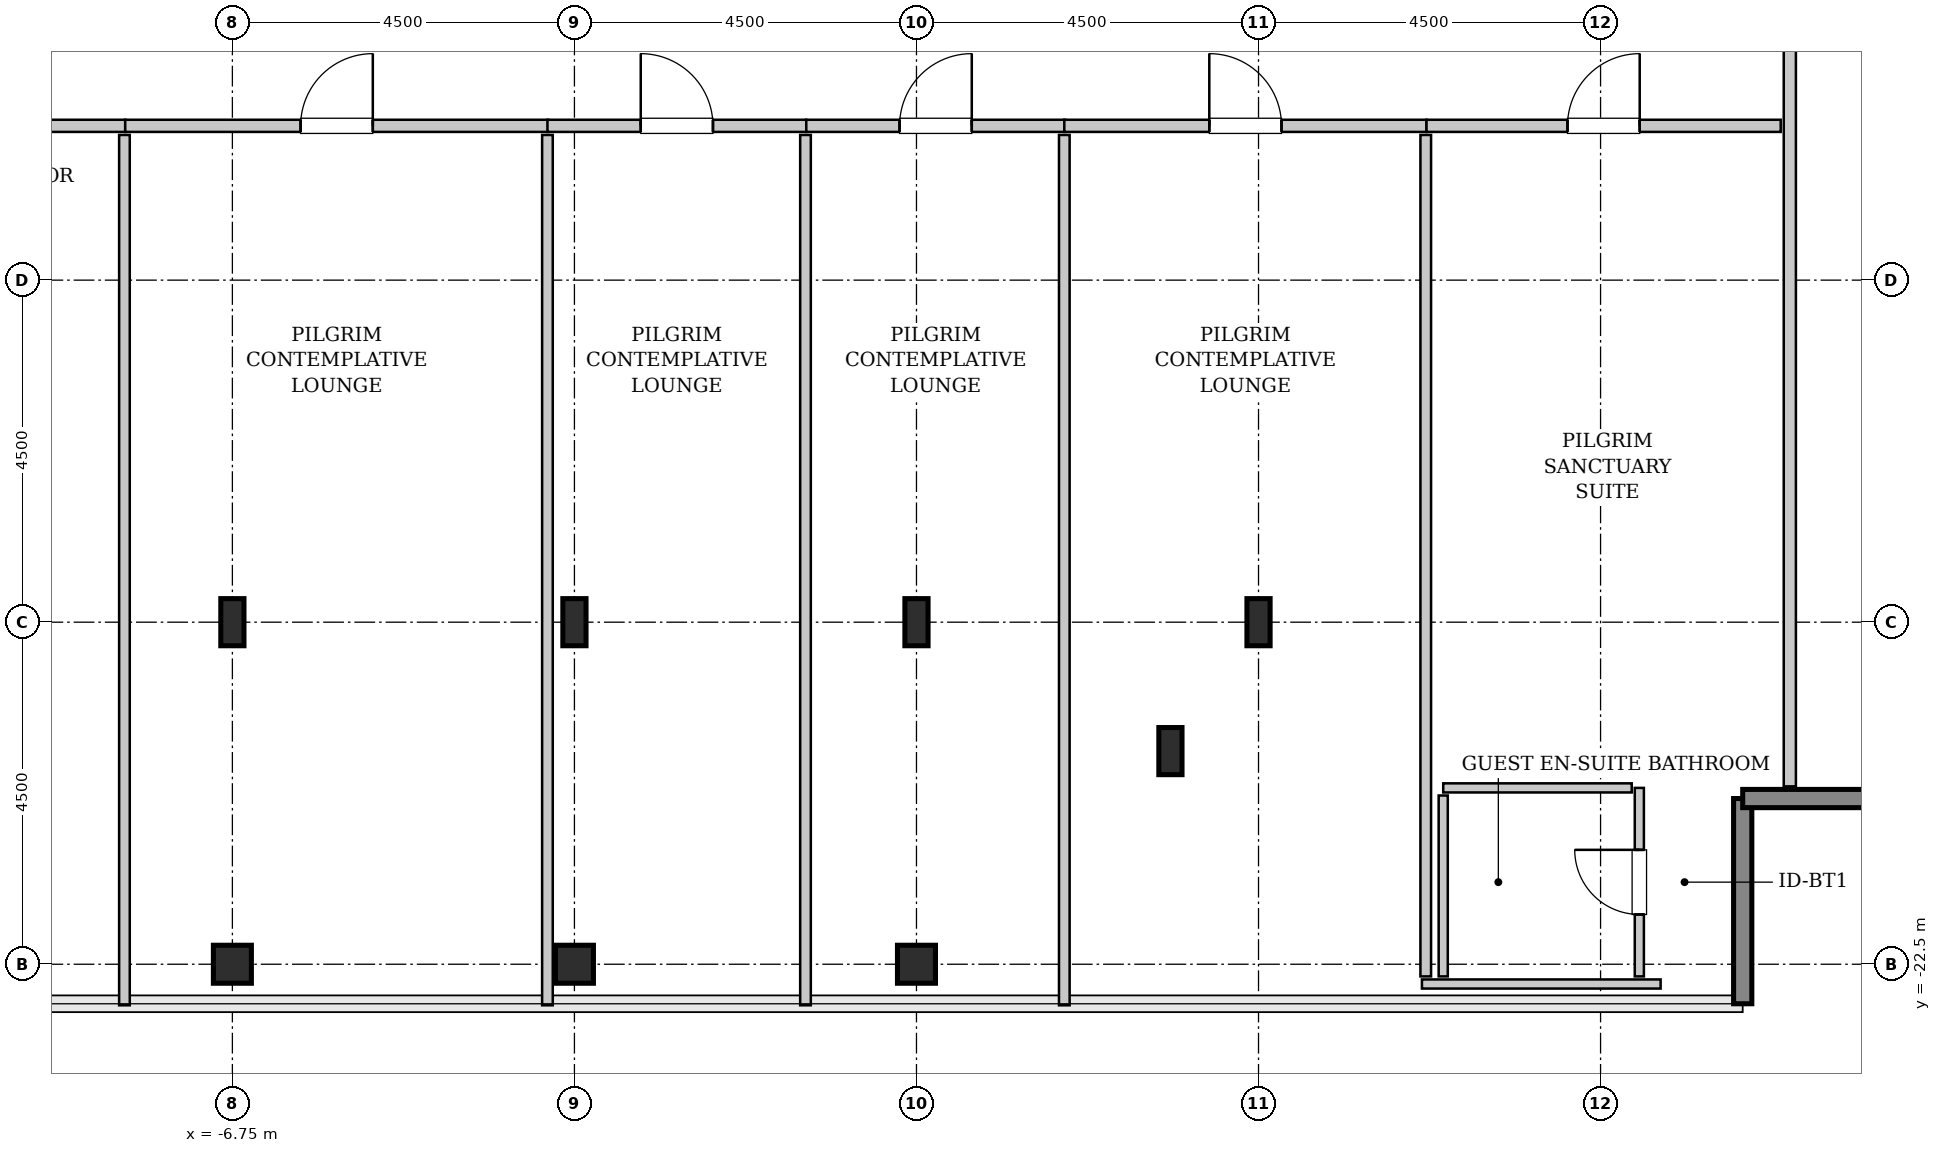
"""IFC4 building model, lengths in metres.
Left out: names, types, materials, properties, quantities, classifications, styles, units other than length and angle.
Written with IfcOpenShell. Run it as: python <this file> out.ifc"""

import sys

from ifc_helpers import new_model, si_unit, direction, frame, frame_2d, origin, origin_2d, place, context, subcontext, project, spatial, rectangle, hollow_rectangle, i_section, extrude, source, transform, mapped, element, fill, save


model = new_model("IFC4")
c1 = context("Model", 3, precision=1e-05, world=origin(), true_north=direction((0.0, 1.0)))
c2 = subcontext(c1, "Body", "Model", "MODEL_VIEW")
j1 = project(units=[si_unit("LENGTHUNIT", "METRE"), si_unit("PLANEANGLEUNIT", "RADIAN")], contexts=[c1])
p1 = place(None, origin())
s1 = spatial("IfcSite", under=j1, at=p1, CompositionType="ELEMENT")
p2 = place(p1, origin())
s2 = spatial("IfcBuilding", under=s1, at=p2, CompositionType="ELEMENT")
p3 = place(p2, frame((0.0, 0.0, 333.8)))
s3 = spatial("IfcBuildingStorey", under=s2, at=p3, CompositionType="ELEMENT", Elevation=333.8)
m1 = source(origin(), c2, "Body", "SweptSolid", [
    extrude(hollow_rectangle(XDim=0.5, YDim=0.5, WallThickness=0.025, InnerFilletRadius=0.025, OuterFilletRadius=0.05, at=origin_2d()), origin(), (0.0, 0.0, 1.0), 3.8),
])
p4 = place(p3, frame((-6.75, -22.5, 0.0), z_axis=(0.0, 0.0, 1.0), x_axis=(1.0, 0.0, 0.0)))
e1 = element("IfcColumn", 1, at=p4, inside=s3, PredefinedType="COLUMN", context=c2, shape_type="MappedRepresentation", body=[
    mapped(m1, transform((0.0, 0.0, 0.0), x_axis=(1.0, 0.0, 0.0), y_axis=(0.0, 1.0, 0.0), z_axis=(0.0, 0.0, 1.0), scale=1.0)),
])
m2 = source(origin(), c2, "Body", "SweptSolid", [
    extrude(i_section(OverallWidth=0.305, OverallDepth=0.62, WebThickness=0.021, FlangeThickness=0.04, FilletRadius=0.027, at=origin_2d()), origin(), (0.0, 0.0, 1.0), 3.8),
])
p5 = place(p3, frame((-6.75, -18.0, 0.0), z_axis=(0.0, 0.0, 1.0), x_axis=(1.0, 0.0, 0.0)))
e2 = element("IfcColumn", 2, at=p5, inside=s3, PredefinedType="COLUMN", context=c2, shape_type="MappedRepresentation", body=[
    mapped(m2, transform((0.0, 0.0, 0.0), x_axis=(1.0, 0.0, 0.0), y_axis=(0.0, 1.0, 0.0), z_axis=(0.0, 0.0, 1.0), scale=1.0)),
])
p6 = place(p3, frame((-2.25, -22.5, 0.0), z_axis=(0.0, 0.0, 1.0), x_axis=(1.0, 0.0, 0.0)))
e3 = element("IfcColumn", 3, at=p6, inside=s3, PredefinedType="COLUMN", context=c2, shape_type="MappedRepresentation", body=[
    mapped(m1, transform((0.0, 0.0, 0.0), x_axis=(1.0, 0.0, 0.0), y_axis=(0.0, 1.0, 0.0), z_axis=(0.0, 0.0, 1.0), scale=1.0)),
])
p7 = place(p3, frame((-2.25, -18.0, 0.0), z_axis=(0.0, 0.0, 1.0), x_axis=(1.0, 0.0, 0.0)))
e4 = element("IfcColumn", 4, at=p7, inside=s3, PredefinedType="COLUMN", context=c2, shape_type="MappedRepresentation", body=[
    mapped(m2, transform((0.0, 0.0, 0.0), x_axis=(1.0, 0.0, 0.0), y_axis=(0.0, 1.0, 0.0), z_axis=(0.0, 0.0, 1.0), scale=1.0)),
])
p8 = place(p3, frame((2.25, -22.5, 0.0), z_axis=(0.0, 0.0, 1.0), x_axis=(1.0, 0.0, 0.0)))
e5 = element("IfcColumn", 5, at=p8, inside=s3, PredefinedType="COLUMN", context=c2, shape_type="MappedRepresentation", body=[
    mapped(m1, transform((0.0, 0.0, 0.0), x_axis=(1.0, 0.0, 0.0), y_axis=(0.0, 1.0, 0.0), z_axis=(0.0, 0.0, 1.0), scale=1.0)),
])
for number, where, z_axis, x_axis in (
    (6, (2.25, -18.0, 0.0), (0.0, 0.0, 1.0), (1.0, 0.0, 0.0)),
    (7, (5.591, -19.696, 0.0), (0.0, 0.0, 1.0), (1.0, 0.0, 0.0)),
    (8, (6.75, -18.0, 0.0), (0.0, 0.0, 1.0), (1.0, 0.0, 0.0)),
):
    element("IfcColumn", number, at=place(p3, frame(where, z_axis=z_axis, x_axis=x_axis)), inside=s3, PredefinedType="COLUMN", context=c2, shape_type="MappedRepresentation", body=[
        mapped(m2, transform((0.0, 0.0, 0.0), x_axis=(1.0, 0.0, 0.0), y_axis=(0.0, 1.0, 0.0), z_axis=(0.0, 0.0, 1.0), scale=1.0)),
    ])
m3 = source(origin(), c2, "Body", "SweptSolid", [
    extrude(rectangle(XDim=2.7, YDim=0.24, at=frame_2d((1.35, 0.0))), origin(), (0.0, 0.0, 1.0), 3.55),
])
for number, where, z_axis, x_axis in (
    (9, (13.12, -23.02, 0.0), (0.0, 0.0, 1.0), (0.0, 1.0, 0.0)),
    (10, (13.12, -20.32, 0.0), (0.0, 0.0, 1.0), (1.0, 0.0, 0.0)),
):
    element("IfcWall", number, at=place(p3, frame(where, z_axis=z_axis, x_axis=x_axis)), inside=s3, PredefinedType="SHEAR", context=c2, shape_type="MappedRepresentation", body=[
        mapped(m3, transform((0.0, 0.0, 0.0), x_axis=(1.0, 0.0, 0.0), y_axis=(0.0, 1.0, 0.0), z_axis=(0.0, 0.0, 1.0), scale=1.0)),
    ])
m4 = source(origin(), c2, "Body", "SweptSolid", [
    extrude(rectangle(XDim=3.14, YDim=0.12, at=frame_2d((1.57, 0.0))), origin(), (0.0, 0.0, 1.0), 3.535),
])
p9 = place(p3, frame((8.9, -22.76, 0.0), z_axis=(0.0, 0.0, 1.0), x_axis=(1.0, 0.0, 0.0)))
e11 = element("IfcWall", 11, at=p9, inside=s3, PredefinedType="PLUMBINGWALL", context=c2, shape_type="MappedRepresentation", body=[
    mapped(m4, transform((0.0, 0.0, 0.0), x_axis=(1.0, 0.0, 0.0), y_axis=(0.0, 1.0, 0.0), z_axis=(0.0, 0.0, 1.0), scale=1.0)),
])
m5 = source(origin(), c2, "Body", "SweptSolid", [
    extrude(rectangle(XDim=2.48, YDim=0.12, at=frame_2d((1.24, 0.0))), origin(), (0.0, 0.0, 1.0), 3.535),
])
p10 = place(p3, frame((11.76, -22.66, 0.0), z_axis=(0.0, 0.0, 1.0), x_axis=(0.0, 1.0, 0.0)))
e12 = element("IfcWall", 12, at=p10, inside=s3, PredefinedType="PLUMBINGWALL", context=c2, shape_type="MappedRepresentation", body=[
    mapped(m5, transform((0.0, 0.0, 0.0), x_axis=(1.0, 0.0, 0.0), y_axis=(0.0, 1.0, 0.0), z_axis=(0.0, 0.0, 1.0), scale=1.0)),
])
p11 = place(p10, frame((0.815, 0.0, 0.0)))
e13 = element("IfcOpeningElement", 13, at=p11, cuts=e12, PredefinedType="OPENING", context=c2, shape_type="SweptSolid", body=[
    extrude(rectangle(XDim=0.85, YDim=2.1, at=frame_2d((0.425, 1.05))), frame((0.0, 0.07, 0.0), z_axis=(0.0, -1.0, 0.0), x_axis=(1.0, 0.0, 0.0)), (0.0, 0.0, 1.0), 0.14),
])
p12 = place(p3, frame((9.18, -20.18, 0.0), z_axis=(0.0, 0.0, 1.0), x_axis=(1.0, 0.0, 0.0)))
e14 = element("IfcWall", 14, at=p12, inside=s3, PredefinedType="PLUMBINGWALL", context=c2, shape_type="MappedRepresentation", body=[
    mapped(m5, transform((0.0, 0.0, 0.0), x_axis=(1.0, 0.0, 0.0), y_axis=(0.0, 1.0, 0.0), z_axis=(0.0, 0.0, 1.0), scale=1.0)),
])
m6 = source(origin(), c2, "Body", "SweptSolid", [
    extrude(rectangle(XDim=2.38, YDim=0.12, at=frame_2d((1.19, 0.0))), origin(), (0.0, 0.0, 1.0), 3.535),
])
p13 = place(p3, frame((9.18, -22.66, 0.0), z_axis=(0.0, 0.0, 1.0), x_axis=(0.0, 1.0, 0.0)))
e15 = element("IfcWall", 15, at=p13, inside=s3, PredefinedType="PLUMBINGWALL", context=c2, shape_type="MappedRepresentation", body=[
    mapped(m6, transform((0.0, 0.0, 0.0), x_axis=(1.0, 0.0, 0.0), y_axis=(0.0, 1.0, 0.0), z_axis=(0.0, 0.0, 1.0), scale=1.0)),
])
m7 = source(origin(), c2, "Body", "SweptSolid", [
    extrude(rectangle(XDim=16.965, YDim=0.16, at=frame_2d((8.482, 0.0))), origin(), (0.0, 0.0, 1.0), 3.535),
])
p14 = place(p3, frame((13.74, -20.16, 0.0), z_axis=(0.0, 0.0, 1.0), x_axis=(0.0, 1.0, 0.0)))
e16 = element("IfcWall", 16, at=p14, inside=s3, PredefinedType="PARTITIONING", context=c2, shape_type="MappedRepresentation", body=[
    mapped(m7, transform((0.0, 0.0, 0.0), x_axis=(1.0, 0.0, 0.0), y_axis=(0.0, 1.0, 0.0), z_axis=(0.0, 0.0, 1.0), scale=1.0)),
])
p15 = place(p14, frame((12.333, 0.0, 0.0)))
e17 = element("IfcOpeningElement", 17, at=p15, cuts=e16, PredefinedType="OPENING", context=c2, shape_type="SweptSolid", body=[
    extrude(rectangle(XDim=0.95, YDim=2.1, at=frame_2d((0.475, 1.05))), frame((0.0, 0.09, 0.0), z_axis=(0.0, -1.0, 0.0), x_axis=(1.0, 0.0, 0.0)), (0.0, 0.0, 1.0), 0.18),
])
m8 = source(origin(), c2, "Body", "SweptSolid", [
    extrude(rectangle(XDim=5.46, YDim=0.16, at=frame_2d((2.73, 0.0))), origin(), (0.0, 0.0, 1.0), 3.535),
])
p16 = place(p3, frame((-13.62, -11.47, 0.0), z_axis=(0.0, 0.0, 1.0), x_axis=(1.0, 0.0, 0.0)))
e18 = element("IfcWall", 18, at=p16, inside=s3, PredefinedType="PARTITIONING", context=c2, shape_type="MappedRepresentation", body=[
    mapped(m8, transform((0.0, 0.0, 0.0), x_axis=(1.0, 0.0, 0.0), y_axis=(0.0, 1.0, 0.0), z_axis=(0.0, 0.0, 1.0), scale=1.0)),
])
p17 = place(p16, frame((2.255, 0.0, 0.0)))
e19 = element("IfcOpeningElement", 19, at=p17, cuts=e18, PredefinedType="OPENING", context=c2, shape_type="SweptSolid", body=[
    extrude(rectangle(XDim=0.95, YDim=2.1, at=frame_2d((0.475, 1.05))), frame((0.0, 0.09, 0.0), z_axis=(0.0, -1.0, 0.0), x_axis=(1.0, 0.0, 0.0)), (0.0, 0.0, 1.0), 0.18),
])
m9 = source(origin(), c2, "Body", "SweptSolid", [
    extrude(rectangle(XDim=11.45, YDim=0.14, at=frame_2d((5.725, 0.0))), origin(), (0.0, 0.0, 1.0), 3.535),
])
p18 = place(p3, frame((-8.17, -23.04, 0.0), z_axis=(0.0, 0.0, 1.0), x_axis=(0.0, 1.0, 0.0)))
e20 = element("IfcWall", 20, at=p18, inside=s3, PredefinedType="PARTITIONING", context=c2, shape_type="MappedRepresentation", body=[
    mapped(m9, transform((0.0, 0.0, 0.0), x_axis=(1.0, 0.0, 0.0), y_axis=(0.0, 1.0, 0.0), z_axis=(0.0, 0.0, 1.0), scale=1.0)),
])
m10 = source(origin(), c2, "Body", "SweptSolid", [
    extrude(rectangle(XDim=5.565, YDim=0.16, at=frame_2d((2.782, 0.0))), origin(), (0.0, 0.0, 1.0), 3.535),
])
p19 = place(p3, frame((-8.16, -11.47, 0.0), z_axis=(0.0, 0.0, 1.0), x_axis=(1.0, 0.0, 0.0)))
e21 = element("IfcWall", 21, at=p19, inside=s3, PredefinedType="PARTITIONING", context=c2, shape_type="MappedRepresentation", body=[
    mapped(m10, transform((0.0, 0.0, 0.0), x_axis=(1.0, 0.0, 0.0), y_axis=(0.0, 1.0, 0.0), z_axis=(0.0, 0.0, 1.0), scale=1.0)),
])
p20 = place(p19, frame((2.308, 0.0, 0.0)))
e22 = element("IfcOpeningElement", 22, at=p20, cuts=e21, PredefinedType="OPENING", context=c2, shape_type="SweptSolid", body=[
    extrude(rectangle(XDim=0.95, YDim=2.1, at=frame_2d((0.475, 1.05))), frame((0.0, 0.09, 0.0), z_axis=(0.0, -1.0, 0.0), x_axis=(1.0, 0.0, 0.0)), (0.0, 0.0, 1.0), 0.18),
])
m11 = source(origin(), c2, "Body", "SweptSolid", [
    extrude(rectangle(XDim=11.45, YDim=0.14, at=frame_2d((5.725, 0.0))), origin(), (0.0, 0.0, 1.0), 2.975),
])
p21 = place(p3, frame((-2.605, -23.04, 0.0), z_axis=(0.0, 0.0, 1.0), x_axis=(0.0, 1.0, 0.0)))
e23 = element("IfcWall", 23, at=p21, inside=s3, PredefinedType="PARTITIONING", context=c2, shape_type="MappedRepresentation", body=[
    mapped(m11, transform((0.0, 0.0, 0.0), x_axis=(1.0, 0.0, 0.0), y_axis=(0.0, 1.0, 0.0), z_axis=(0.0, 0.0, 1.0), scale=1.0)),
])
m12 = source(origin(), c2, "Body", "SweptSolid", [
    extrude(rectangle(XDim=3.405, YDim=0.16, at=frame_2d((1.703, 0.0))), origin(), (0.0, 0.0, 1.0), 3.535),
])
p22 = place(p3, frame((-2.605, -11.47, 0.0), z_axis=(0.0, 0.0, 1.0), x_axis=(1.0, 0.0, 0.0)))
e24 = element("IfcWall", 24, at=p22, inside=s3, PredefinedType="PARTITIONING", context=c2, shape_type="MappedRepresentation", body=[
    mapped(m12, transform((0.0, 0.0, 0.0), x_axis=(1.0, 0.0, 0.0), y_axis=(0.0, 1.0, 0.0), z_axis=(0.0, 0.0, 1.0), scale=1.0)),
])
p23 = place(p22, frame((1.228, 0.0, 0.0)))
e25 = element("IfcOpeningElement", 25, at=p23, cuts=e24, PredefinedType="OPENING", context=c2, shape_type="SweptSolid", body=[
    extrude(rectangle(XDim=0.95, YDim=2.1, at=frame_2d((0.475, 1.05))), frame((0.0, 0.09, 0.0), z_axis=(0.0, -1.0, 0.0), x_axis=(1.0, 0.0, 0.0)), (0.0, 0.0, 1.0), 0.18),
])
p24 = place(p3, frame((0.79, -23.04, 0.0), z_axis=(0.0, 0.0, 1.0), x_axis=(0.0, 1.0, 0.0)))
e26 = element("IfcWall", 26, at=p24, inside=s3, PredefinedType="PARTITIONING", context=c2, shape_type="MappedRepresentation", body=[
    mapped(m9, transform((0.0, 0.0, 0.0), x_axis=(1.0, 0.0, 0.0), y_axis=(0.0, 1.0, 0.0), z_axis=(0.0, 0.0, 1.0), scale=1.0)),
])
p25 = place(p3, frame((0.8, -11.47, 0.0), z_axis=(0.0, 0.0, 1.0), x_axis=(1.0, 0.0, 0.0)))
e27 = element("IfcWall", 27, at=p25, inside=s3, PredefinedType="PARTITIONING", context=c2, shape_type="MappedRepresentation", body=[
    mapped(m12, transform((0.0, 0.0, 0.0), x_axis=(1.0, 0.0, 0.0), y_axis=(0.0, 1.0, 0.0), z_axis=(0.0, 0.0, 1.0), scale=1.0)),
])
p26 = place(p25, frame((1.228, 0.0, 0.0)))
e28 = element("IfcOpeningElement", 28, at=p26, cuts=e27, PredefinedType="OPENING", context=c2, shape_type="SweptSolid", body=[
    extrude(rectangle(XDim=0.95, YDim=2.1, at=frame_2d((0.475, 1.05))), frame((0.0, 0.09, 0.0), z_axis=(0.0, -1.0, 0.0), x_axis=(1.0, 0.0, 0.0)), (0.0, 0.0, 1.0), 0.18),
])
p27 = place(p3, frame((4.195, -23.04, 0.0), z_axis=(0.0, 0.0, 1.0), x_axis=(0.0, 1.0, 0.0)))
e29 = element("IfcWall", 29, at=p27, inside=s3, PredefinedType="PARTITIONING", context=c2, shape_type="MappedRepresentation", body=[
    mapped(m9, transform((0.0, 0.0, 0.0), x_axis=(1.0, 0.0, 0.0), y_axis=(0.0, 1.0, 0.0), z_axis=(0.0, 0.0, 1.0), scale=1.0)),
])
m13 = source(origin(), c2, "Body", "SweptSolid", [
    extrude(rectangle(XDim=4.765, YDim=0.16, at=frame_2d((2.382, 0.0))), origin(), (0.0, 0.0, 1.0), 3.535),
])
p28 = place(p3, frame((4.195, -11.47, 0.0), z_axis=(0.0, 0.0, 1.0), x_axis=(1.0, 0.0, 0.0)))
e30 = element("IfcWall", 30, at=p28, inside=s3, PredefinedType="PARTITIONING", context=c2, shape_type="MappedRepresentation", body=[
    mapped(m13, transform((0.0, 0.0, 0.0), x_axis=(1.0, 0.0, 0.0), y_axis=(0.0, 1.0, 0.0), z_axis=(0.0, 0.0, 1.0), scale=1.0)),
])
p29 = place(p28, frame((1.907, 0.0, 0.0)))
e31 = element("IfcOpeningElement", 31, at=p29, cuts=e30, PredefinedType="OPENING", context=c2, shape_type="SweptSolid", body=[
    extrude(rectangle(XDim=0.95, YDim=2.1, at=frame_2d((0.475, 1.05))), frame((0.0, 0.09, 0.0), z_axis=(0.0, -1.0, 0.0), x_axis=(1.0, 0.0, 0.0)), (0.0, 0.0, 1.0), 0.18),
])
m14 = source(origin(), c2, "Body", "SweptSolid", [
    extrude(rectangle(XDim=11.07, YDim=0.14, at=frame_2d((5.535, 0.0))), origin(), (0.0, 0.0, 1.0), 3.535),
])
p30 = place(p3, frame((8.95, -22.66, 0.0), z_axis=(0.0, 0.0, 1.0), x_axis=(0.0, 1.0, 0.0)))
e32 = element("IfcWall", 32, at=p30, inside=s3, PredefinedType="PARTITIONING", context=c2, shape_type="MappedRepresentation", body=[
    mapped(m14, transform((0.0, 0.0, 0.0), x_axis=(1.0, 0.0, 0.0), y_axis=(0.0, 1.0, 0.0), z_axis=(0.0, 0.0, 1.0), scale=1.0)),
])
m15 = source(origin(), c2, "Body", "SweptSolid", [
    extrude(rectangle(XDim=4.66, YDim=0.16, at=frame_2d((2.33, 0.0))), origin(), (0.0, 0.0, 1.0), 3.535),
])
p31 = place(p3, frame((8.96, -11.47, 0.0), z_axis=(0.0, 0.0, 1.0), x_axis=(1.0, 0.0, 0.0)))
e33 = element("IfcWall", 33, at=p31, inside=s3, PredefinedType="PARTITIONING", context=c2, shape_type="MappedRepresentation", body=[
    mapped(m15, transform((0.0, 0.0, 0.0), x_axis=(1.0, 0.0, 0.0), y_axis=(0.0, 1.0, 0.0), z_axis=(0.0, 0.0, 1.0), scale=1.0)),
])
p32 = place(p31, frame((1.855, 0.0, 0.0)))
e34 = element("IfcOpeningElement", 34, at=p32, cuts=e33, PredefinedType="OPENING", context=c2, shape_type="SweptSolid", body=[
    extrude(rectangle(XDim=0.95, YDim=2.1, at=frame_2d((0.475, 1.05))), frame((0.0, 0.09, 0.0), z_axis=(0.0, -1.0, 0.0), x_axis=(1.0, 0.0, 0.0)), (0.0, 0.0, 1.0), 0.18),
])
m16 = source(origin(), c2, "Body", "SweptSolid", [
    extrude(rectangle(XDim=0.85, YDim=2.1, at=frame_2d((0.425, 1.05))), frame((0.0, 0.025, 0.0), z_axis=(0.0, -1.0, 0.0), x_axis=(1.0, 0.0, 0.0)), (0.0, 0.0, 1.0), 0.05),
])
p33 = place(p11, origin())
e35 = element("IfcDoor", 35, at=p33, inside=s3, OperationType="SINGLE_SWING_RIGHT", PredefinedType="DOOR", context=c2, shape_type="MappedRepresentation", body=[
    mapped(m16, transform((0.0, 0.0, 0.0), x_axis=(1.0, 0.0, 0.0), y_axis=(0.0, 1.0, 0.0), z_axis=(0.0, 0.0, 1.0), scale=1.0)),
])
fill(e13, e35)
m17 = source(origin(), c2, "Body", "SweptSolid", [
    extrude(rectangle(XDim=0.95, YDim=2.1, at=frame_2d((0.475, 1.05))), frame((0.0, 0.025, 0.0), z_axis=(0.0, -1.0, 0.0), x_axis=(1.0, 0.0, 0.0)), (0.0, 0.0, 1.0), 0.05),
])
p34 = place(p20, origin())
e36 = element("IfcDoor", 36, at=p34, inside=s3, OperationType="SINGLE_SWING_RIGHT", PredefinedType="DOOR", context=c2, shape_type="MappedRepresentation", body=[
    mapped(m17, transform((0.0, 0.0, 0.0), x_axis=(1.0, 0.0, 0.0), y_axis=(0.0, 1.0, 0.0), z_axis=(0.0, 0.0, 1.0), scale=1.0)),
])
fill(e22, e36)
p35 = place(p23, origin())
e37 = element("IfcDoor", 37, at=p35, inside=s3, OperationType="SINGLE_SWING_LEFT", PredefinedType="DOOR", context=c2, shape_type="MappedRepresentation", body=[
    mapped(m17, transform((0.0, 0.0, 0.0), x_axis=(1.0, 0.0, 0.0), y_axis=(0.0, 1.0, 0.0), z_axis=(0.0, 0.0, 1.0), scale=1.0)),
])
fill(e25, e37)
p36 = place(p26, origin())
e38 = element("IfcDoor", 38, at=p36, inside=s3, OperationType="SINGLE_SWING_RIGHT", PredefinedType="DOOR", context=c2, shape_type="MappedRepresentation", body=[
    mapped(m17, transform((0.0, 0.0, 0.0), x_axis=(1.0, 0.0, 0.0), y_axis=(0.0, 1.0, 0.0), z_axis=(0.0, 0.0, 1.0), scale=1.0)),
])
fill(e28, e38)
p37 = place(p29, origin())
e39 = element("IfcDoor", 39, at=p37, inside=s3, OperationType="SINGLE_SWING_LEFT", PredefinedType="DOOR", context=c2, shape_type="MappedRepresentation", body=[
    mapped(m17, transform((0.0, 0.0, 0.0), x_axis=(1.0, 0.0, 0.0), y_axis=(0.0, 1.0, 0.0), z_axis=(0.0, 0.0, 1.0), scale=1.0)),
])
fill(e31, e39)
p38 = place(p32, origin())
e40 = element("IfcDoor", 40, at=p38, inside=s3, OperationType="SINGLE_SWING_RIGHT", PredefinedType="DOOR", context=c2, shape_type="MappedRepresentation", body=[
    mapped(m17, transform((0.0, 0.0, 0.0), x_axis=(1.0, 0.0, 0.0), y_axis=(0.0, 1.0, 0.0), z_axis=(0.0, 0.0, 1.0), scale=1.0)),
])
fill(e34, e40)
save(model, sys.argv[1])
